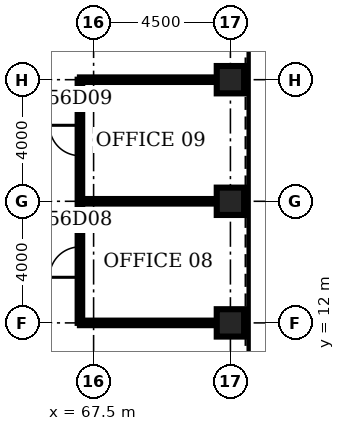
"""IFC4 building model, lengths in metres.
Left out: names, types, materials, properties, quantities, classifications, styles, units other than length and angle.
Written with IfcOpenShell. Run it as: python <this file> out.ifc"""

import sys

from ifc_helpers import new_model, si_unit, direction, frame, frame_2d, origin, origin_2d, place, context, subcontext, project, spatial, rectangle, hollow_rectangle, extrude, element, fill, save


model = new_model("IFC4")
c1 = context("Model", 3, precision=1e-05, world=origin(), true_north=direction((0.0, 1.0)))
c2 = subcontext(c1, "Body", "Model", "MODEL_VIEW")
j1 = project(units=[si_unit("LENGTHUNIT", "METRE"), si_unit("PLANEANGLEUNIT", "RADIAN")], contexts=[c1])
p1 = place(None, origin())
s1 = spatial("IfcSite", under=j1, at=p1, CompositionType="ELEMENT")
p2 = place(p1, origin())
s2 = spatial("IfcBuilding", under=s1, at=p2, CompositionType="ELEMENT")
p3 = place(p2, frame((0.0, 0.0, 248.8)))
s3 = spatial("IfcBuildingStorey", under=s2, at=p3, CompositionType="ELEMENT", Elevation=248.8)
for number, where, z_axis, x_axis in (
    (1, (72.0, 12.0, 0.0), (0.0, 0.0, 1.0), (1.0, 0.0, 0.0)),
    (2, (72.0, 16.0, 0.0), (0.0, 0.0, 1.0), (1.0, 0.0, 0.0)),
    (3, (72.0, 20.0, 0.0), (0.0, 0.0, 1.0), (1.0, 0.0, 0.0)),
):
    element("IfcColumn", number, at=place(p3, frame(where, z_axis=z_axis, x_axis=x_axis)), inside=s3, PredefinedType="COLUMN", context=c2, shape_type="SweptSolid", body=[
        extrude(hollow_rectangle(XDim=0.9, YDim=0.9, WallThickness=0.07, at=origin_2d()), origin(), (0.0, 0.0, 1.0), 4.2),
    ])
for number, where, z_axis, x_axis in (
    (4, (67.05, 12.0, 0.0), (0.0, 0.0, 1.0), (1.0, 0.0, 0.0)),
    (5, (67.05, 16.0, 0.0), (0.0, 0.0, 1.0), (1.0, 0.0, 0.0)),
    (6, (67.05, 20.0, 0.0), (0.0, 0.0, 1.0), (1.0, 0.0, 0.0)),
):
    element("IfcWall", number, at=place(p3, frame(where, z_axis=z_axis, x_axis=x_axis)), inside=s3, PredefinedType="PARTITIONING", context=c2, shape_type="SweptSolid", body=[
        extrude(rectangle(XDim=4.5, YDim=0.15, at=frame_2d((2.25, 0.0))), origin(), (0.0, 0.0, 1.0), 3.0),
    ])
p4 = place(p3, frame((67.05, 12.0, 0.0), z_axis=(0.0, 0.0, 1.0), x_axis=(0.0, 1.0, 0.0)))
e7 = element("IfcWall", 7, at=p4, inside=s3, PredefinedType="PARTITIONING", context=c2, shape_type="SweptSolid", body=[
    extrude(rectangle(XDim=8.0, YDim=0.15, at=frame_2d((4.0, 0.0))), origin(), (0.0, 0.0, 1.0), 3.0),
])
p5 = place(p4, frame((1.5, 0.0, 0.0)))
e8 = element("IfcOpeningElement", 8, at=p5, cuts=e7, PredefinedType="OPENING", context=c2, shape_type="SweptSolid", body=[
    extrude(rectangle(XDim=1.0, YDim=2.1, at=frame_2d((0.5, 1.05))), frame((0.0, 0.085, 0.0), z_axis=(0.0, -1.0, 0.0), x_axis=(1.0, 0.0, 0.0)), (0.0, 0.0, 1.0), 0.17),
])
p6 = place(p4, frame((5.5, 0.0, 0.0)))
e9 = element("IfcOpeningElement", 9, at=p6, cuts=e7, PredefinedType="OPENING", context=c2, shape_type="SweptSolid", body=[
    extrude(rectangle(XDim=1.0, YDim=2.1, at=frame_2d((0.5, 1.05))), frame((0.0, 0.085, 0.0), z_axis=(0.0, -1.0, 0.0), x_axis=(1.0, 0.0, 0.0)), (0.0, 0.0, 1.0), 0.17),
])
p7 = place(p5, origin())
e10 = element("IfcDoor", 10, at=p7, inside=s3, OperationType="SINGLE_SWING_LEFT", PredefinedType="DOOR", context=c2, shape_type="SweptSolid", body=[
    extrude(rectangle(XDim=1.0, YDim=2.1, at=frame_2d((0.5, 1.05))), frame((0.0, 0.025, 0.0), z_axis=(0.0, -1.0, 0.0), x_axis=(1.0, 0.0, 0.0)), (0.0, 0.0, 1.0), 0.05),
])
fill(e8, e10)
p8 = place(p6, origin())
e11 = element("IfcDoor", 11, at=p8, inside=s3, OperationType="SINGLE_SWING_RIGHT", PredefinedType="DOOR", context=c2, shape_type="SweptSolid", body=[
    extrude(rectangle(XDim=1.0, YDim=2.1, at=frame_2d((0.5, 1.05))), frame((0.0, 0.025, 0.0), z_axis=(0.0, -1.0, 0.0), x_axis=(1.0, 0.0, 0.0)), (0.0, 0.0, 1.0), 0.05),
])
fill(e9, e11)
save(model, sys.argv[1])
